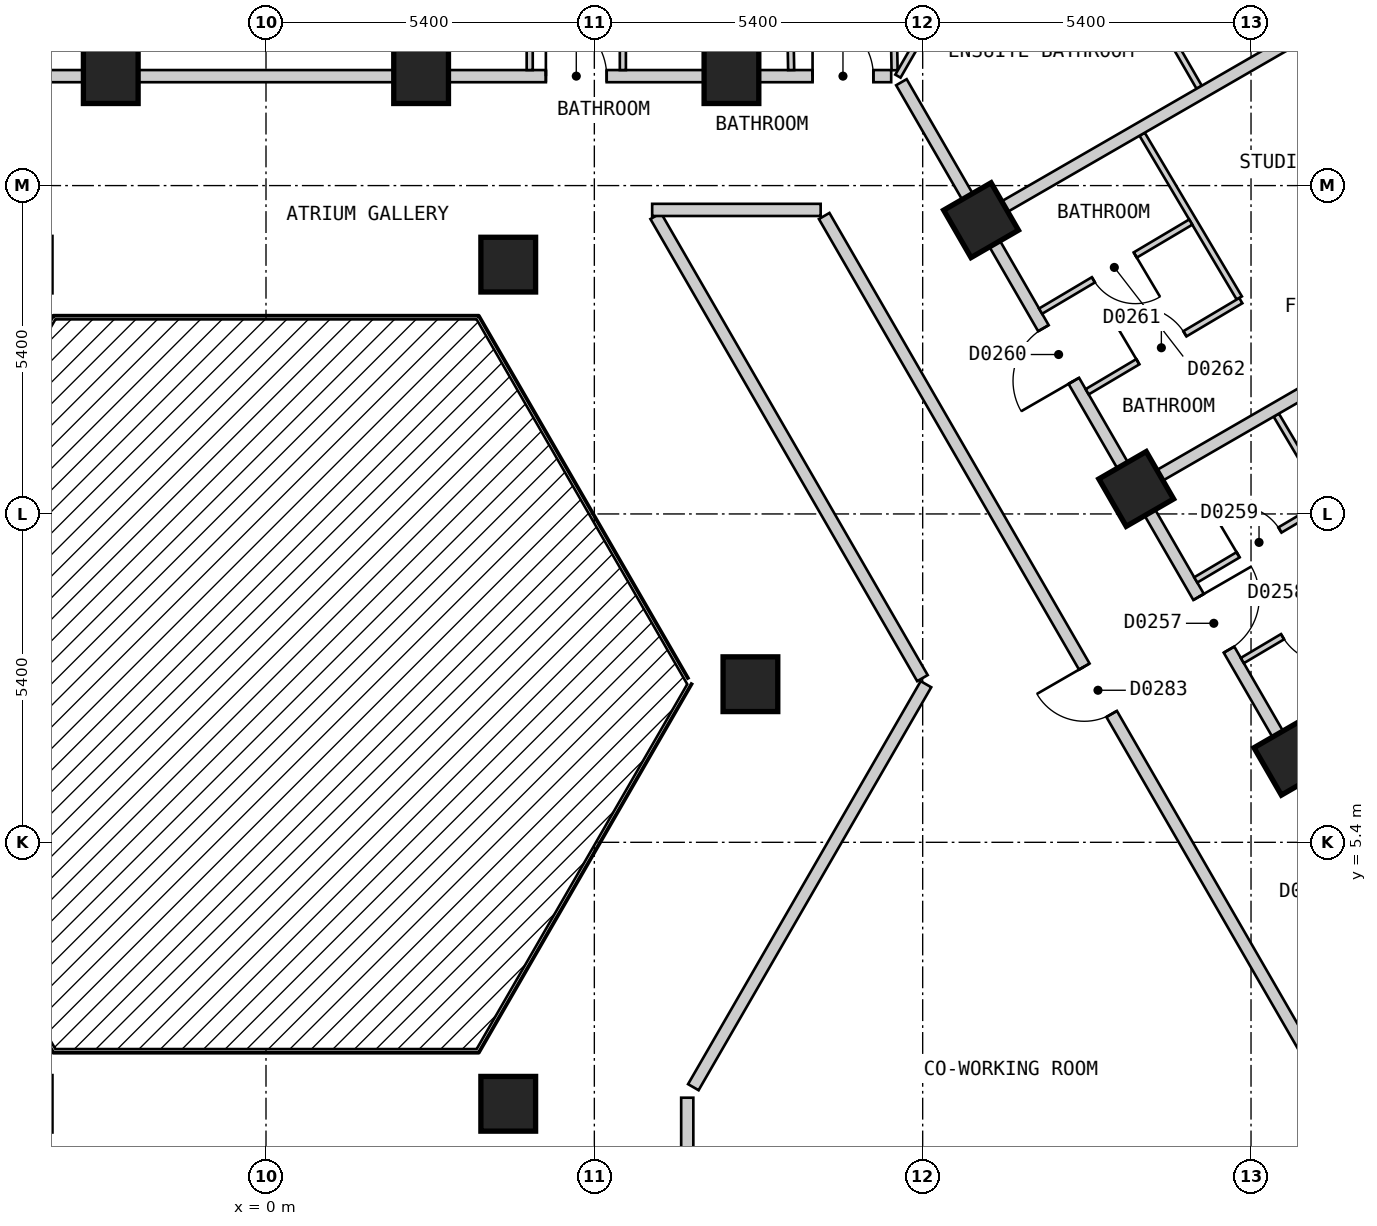
"""IFC4 building model, lengths in metres.
Left out: names, types, materials, properties, quantities, classifications, styles, units other than length and angle.
Written with IfcOpenShell. Run it as: python <this file> out.ifc"""

import sys

from ifc_helpers import new_model, si_unit, direction, frame, frame_2d, origin, origin_2d, place, context, subcontext, project, spatial, rectangle, extrude, element, fill, save


model = new_model("IFC4")
c1 = context("Model", 3, precision=1e-05, world=origin(), true_north=direction((0.0, 1.0)))
c2 = subcontext(c1, "Body", "Model", "MODEL_VIEW")
j1 = project(units=[si_unit("LENGTHUNIT", "METRE"), si_unit("PLANEANGLEUNIT", "RADIAN")], contexts=[c1])
p1 = place(None, origin())
s1 = spatial("IfcSite", under=j1, at=p1, CompositionType="ELEMENT")
p2 = place(p1, origin())
s2 = spatial("IfcBuilding", under=s1, at=p2, CompositionType="ELEMENT")
p3 = place(p2, frame((0.0, 0.0, 47.4)))
s3 = spatial("IfcBuildingStorey", under=s2, at=p3, CompositionType="ELEMENT", Elevation=47.4)
for number, where, z_axis, x_axis in (
    (1, (3.984, 1.1, 0.0), (0.0, 0.0, 1.0), (1.0, 0.0, 0.0)),
    (2, (16.864, 6.791, 0.0), (0.0, 0.0, 1.0), (-0.5, 0.866, 0.0)),
    (3, (14.312, 11.211, 0.0), (0.0, 0.0, 1.0), (-0.5, 0.866, 0.0)),
    (4, (7.967, 8.0, 0.0), (0.0, 0.0, 1.0), (1.0, 0.0, 0.0)),
    (5, (11.76, 15.631, 0.0), (0.0, 0.0, 1.0), (-0.5, 0.866, 0.0)),
    (6, (7.655, 18.0, 0.0), (0.0, 0.0, 1.0), (-1.0, 0.0, 0.0)),
    (7, (3.984, 14.9, 0.0), (0.0, 0.0, 1.0), (1.0, 0.0, 0.0)),
    (8, (2.551, 18.0, 0.0), (0.0, 0.0, 1.0), (-1.0, 0.0, 0.0)),
    (9, (-2.553, 18.0, 0.0), (0.0, 0.0, 1.0), (-1.0, 0.0, 0.0)),
):
    element("IfcColumn", number, at=place(p3, frame(where, z_axis=z_axis, x_axis=x_axis)), inside=s3, PredefinedType="COLUMN", context=c2, shape_type="SweptSolid", body=[
        extrude(rectangle(XDim=0.9, YDim=0.9, at=origin_2d()), origin(), (0.0, 0.0, 1.0), 3.0),
    ])
p4 = place(p3, frame((6.409, 15.7, 0.0), z_axis=(0.0, 0.0, 1.0), x_axis=(0.499930377127, -0.866065596838, 0.0)))
e10 = element("IfcWall", 10, at=p4, inside=s3, PredefinedType="PARTITIONING", context=c2, shape_type="SweptSolid", body=[
    extrude(rectangle(XDim=8.775, YDim=0.2, at=frame_2d((4.388, 0.0))), origin(), (0.0, 0.0, 1.0), 2.7),
])
p5 = place(p3, frame((9.18, 15.7, 0.0), z_axis=(0.0, 0.0, 1.0), x_axis=(0.500003652032, -0.866023295272, 0.0)))
e11 = element("IfcWall", 11, at=p5, inside=s3, PredefinedType="PARTITIONING", context=c2, shape_type="SweptSolid", body=[
    extrude(rectangle(XDim=18.012, YDim=0.2, at=frame_2d((9.006, 0.0))), origin(), (0.0, 0.0, 1.0), 2.7),
])
p6 = place(p5, frame((8.556, 0.0, 0.0)))
e12 = element("IfcOpeningElement", 12, at=p6, cuts=e11, PredefinedType="OPENING", context=c2, shape_type="SweptSolid", body=[
    extrude(rectangle(XDim=0.9, YDim=2.1, at=frame_2d((0.45, 1.05))), frame((0.0, 0.11, 0.0), z_axis=(0.0, -1.0, 0.0), x_axis=(1.0, 0.0, 0.0)), (0.0, 0.0, 1.0), 0.22),
])
p7 = place(p3, frame((10.45, 17.9, 0.0), z_axis=(0.0, 0.0, 1.0), x_axis=(0.500034352617, -0.866005569383, 0.0)))
e13 = element("IfcWall", 13, at=p7, inside=s3, PredefinedType="PARTITIONING", context=c2, shape_type="SweptSolid", body=[
    extrude(rectangle(XDim=20.553, YDim=0.2, at=frame_2d((10.276, 0.0))), origin(), (0.0, 0.0, 1.0), 2.7),
])
p8 = place(p7, frame((14.879, 0.0, 0.0)))
e14 = element("IfcOpeningElement", 14, at=p8, cuts=e13, PredefinedType="OPENING", context=c2, shape_type="SweptSolid", body=[
    extrude(rectangle(XDim=1.0, YDim=2.1, at=frame_2d((0.5, 1.05))), frame((0.0, 0.11, 0.0), z_axis=(0.0, -1.0, 0.0), x_axis=(1.0, 0.0, 0.0)), (0.0, 0.0, 1.0), 0.22),
])
p9 = place(p7, frame((9.775, 0.0, 0.0)))
e15 = element("IfcOpeningElement", 15, at=p9, cuts=e13, PredefinedType="OPENING", context=c2, shape_type="SweptSolid", body=[
    extrude(rectangle(XDim=1.0, YDim=2.1, at=frame_2d((0.5, 1.05))), frame((0.0, 0.11, 0.0), z_axis=(0.0, -1.0, 0.0), x_axis=(1.0, 0.0, 0.0)), (0.0, 0.0, 1.0), 0.22),
])
p10 = place(p7, frame((4.671, 0.0, 0.0)))
e16 = element("IfcOpeningElement", 16, at=p10, cuts=e13, PredefinedType="OPENING", context=c2, shape_type="SweptSolid", body=[
    extrude(rectangle(XDim=1.0, YDim=2.1, at=frame_2d((0.5, 1.05))), frame((0.0, 0.11, 0.0), z_axis=(0.0, -1.0, 0.0), x_axis=(1.0, 0.0, 0.0)), (0.0, 0.0, 1.0), 0.22),
])
p11 = place(p3, frame((6.351, 15.8, 0.0), z_axis=(0.0, 0.0, 1.0), x_axis=(1.0, 0.0, 0.0)))
e17 = element("IfcWall", 17, at=p11, inside=s3, PredefinedType="PARTITIONING", context=c2, shape_type="SweptSolid", body=[
    extrude(rectangle(XDim=2.771, YDim=0.2, at=frame_2d((1.385, 0.0))), origin(), (0.0, 0.0, 1.0), 2.7),
])
p12 = place(p3, frame((-10.276, 18.0, 0.0), z_axis=(0.0, 0.0, 1.0), x_axis=(1.0, 0.0, 0.0)))
e18 = element("IfcWall", 18, at=p12, inside=s3, PredefinedType="PARTITIONING", context=c2, shape_type="SweptSolid", body=[
    extrude(rectangle(XDim=20.558, YDim=0.2, at=frame_2d((10.279, 0.0))), origin(), (0.0, 0.0, 1.0), 2.7),
])
p13 = place(p12, frame((19.265, 0.0, 0.0)))
e19 = element("IfcOpeningElement", 19, at=p13, cuts=e18, PredefinedType="OPENING", context=c2, shape_type="SweptSolid", body=[
    extrude(rectangle(XDim=1.0, YDim=2.1, at=frame_2d((0.5, 1.05))), frame((0.0, 0.11, 0.0), z_axis=(0.0, -1.0, 0.0), x_axis=(1.0, 0.0, 0.0)), (0.0, 0.0, 1.0), 0.22),
])
p14 = place(p12, frame((14.879, 0.0, 0.0)))
e20 = element("IfcOpeningElement", 20, at=p14, cuts=e18, PredefinedType="OPENING", context=c2, shape_type="SweptSolid", body=[
    extrude(rectangle(XDim=1.0, YDim=2.1, at=frame_2d((0.5, 1.05))), frame((0.0, 0.11, 0.0), z_axis=(0.0, -1.0, 0.0), x_axis=(1.0, 0.0, 0.0)), (0.0, 0.0, 1.0), 0.22),
])
p15 = place(p12, frame((4.671, 0.0, 0.0)))
e21 = element("IfcOpeningElement", 21, at=p15, cuts=e18, PredefinedType="OPENING", context=c2, shape_type="SweptSolid", body=[
    extrude(rectangle(XDim=1.0, YDim=2.1, at=frame_2d((0.5, 1.05))), frame((0.0, 0.11, 0.0), z_axis=(0.0, -1.0, 0.0), x_axis=(1.0, 0.0, 0.0)), (0.0, 0.0, 1.0), 0.22),
])
p16 = place(p3, frame((7.028, 1.373, 0.0), z_axis=(0.0, 0.0, 1.0), x_axis=(0.49998574534, 0.86603363356, 0.0)))
e22 = element("IfcWall", 22, at=p16, inside=s3, PredefinedType="PARTITIONING", context=c2, shape_type="SweptSolid", body=[
    extrude(rectangle(XDim=7.652, YDim=0.2, at=frame_2d((3.826, 0.0))), origin(), (0.0, 0.0, 1.0), 2.7),
])
p17 = place(p3, frame((6.928, -2.8, 0.0), z_axis=(0.0, 0.0, 1.0), x_axis=(0.0, 1.0, 0.0)))
e23 = element("IfcWall", 23, at=p17, inside=s3, PredefinedType="PARTITIONING", context=c2, shape_type="SweptSolid", body=[
    extrude(rectangle(XDim=4.0, YDim=0.2, at=frame_2d((2.0, 0.0))), origin(), (0.0, 0.0, 1.0), 2.7),
])
p18 = place(p3, frame((16.615, 12.425, 0.0), z_axis=(0.0, 0.0, 1.0), x_axis=(0.510241930604, -0.860030913546, 0.0)))
e24 = element("IfcWall", 24, at=p18, inside=s3, PredefinedType="PARTITIONING", context=c2, shape_type="SweptSolid", body=[
    extrude(rectangle(XDim=3.136, YDim=0.1, at=frame_2d((1.568, 0.0))), origin(), (0.0, 0.0, 1.0), 2.7),
])
p19 = place(p3, frame((14.409, 17.045, 0.0), z_axis=(0.0, 0.0, 1.0), x_axis=(0.510362209222, -0.859959542884, 0.0)))
e25 = element("IfcWall", 25, at=p19, inside=s3, PredefinedType="PARTITIONING", context=c2, shape_type="SweptSolid", body=[
    extrude(rectangle(XDim=3.131, YDim=0.1, at=frame_2d((1.566, 0.0))), origin(), (0.0, 0.0, 1.0), 2.7),
])
p20 = place(p3, frame((12.846, 22.15, 0.0), z_axis=(0.0, 0.0, 1.0), x_axis=(0.500002715276, -0.866023836113, 0.0)))
e26 = element("IfcWall", 26, at=p20, inside=s3, PredefinedType="PARTITIONING", context=c2, shape_type="SweptSolid", body=[
    extrude(rectangle(XDim=5.002, YDim=0.1, at=frame_2d((2.501, 0.0))), origin(), (0.0, 0.0, 1.0), 2.7),
])
p21 = place(p20, frame((2.122, 0.0, 0.0)))
e27 = element("IfcOpeningElement", 27, at=p21, cuts=e26, PredefinedType="OPENING", context=c2, shape_type="SweptSolid", body=[
    extrude(rectangle(XDim=0.8, YDim=2.1, at=frame_2d((0.4, 1.05))), frame((0.0, 0.06, 0.0), z_axis=(0.0, -1.0, 0.0), x_axis=(1.0, 0.0, 0.0)), (0.0, 0.0, 1.0), 0.12),
])
p22 = place(p3, frame((8.562, 22.15, 0.0), z_axis=(0.0, 0.0, 1.0), x_axis=(0.018504185939, -0.999828782894, 0.0)))
e28 = element("IfcWall", 28, at=p22, inside=s3, PredefinedType="PARTITIONING", context=c2, shape_type="SweptSolid", body=[
    extrude(rectangle(XDim=4.051, YDim=0.1, at=frame_2d((2.025, 0.0))), origin(), (0.0, 0.0, 1.0), 2.7),
])
p23 = place(p22, frame((1.65, 0.0, 0.0)))
e29 = element("IfcOpeningElement", 29, at=p23, cuts=e28, PredefinedType="OPENING", context=c2, shape_type="SweptSolid", body=[
    extrude(rectangle(XDim=0.8, YDim=2.1, at=frame_2d((0.4, 1.05))), frame((0.0, 0.06, 0.0), z_axis=(0.0, -1.0, 0.0), x_axis=(1.0, 0.0, 0.0)), (0.0, 0.0, 1.0), 0.12),
])
p24 = place(p3, frame((10.262, 22.15, 0.0), z_axis=(0.0, 0.0, 1.0), x_axis=(0.018730524712, -0.999824568334, 0.0)))
e30 = element("IfcWall", 30, at=p24, inside=s3, PredefinedType="PARTITIONING", context=c2, shape_type="SweptSolid", body=[
    extrude(rectangle(XDim=4.054, YDim=0.1, at=frame_2d((2.027, 0.0))), origin(), (0.0, 0.0, 1.0), 2.7),
])
p25 = place(p24, frame((1.6, 0.0, 0.0)))
e31 = element("IfcOpeningElement", 31, at=p25, cuts=e30, PredefinedType="OPENING", context=c2, shape_type="SweptSolid", body=[
    extrude(rectangle(XDim=0.9, YDim=2.1, at=frame_2d((0.45, 1.05))), frame((0.0, 0.06, 0.0), z_axis=(0.0, -1.0, 0.0), x_axis=(1.0, 0.0, 0.0)), (0.0, 0.0, 1.0), 0.12),
])
p26 = place(p3, frame((2.551, 21.57, 0.0), z_axis=(0.0, 0.0, 1.0), x_axis=(0.0, -1.0, 0.0)))
e32 = element("IfcWall", 32, at=p26, inside=s3, PredefinedType="PARTITIONING", context=c2, shape_type="SweptSolid", body=[
    extrude(rectangle(XDim=3.47, YDim=0.1, at=frame_2d((1.735, 0.0))), origin(), (0.0, 0.0, 1.0), 2.7),
])
p27 = place(p3, frame((10.393, 18.0, 0.0), z_axis=(0.0, 0.0, 1.0), x_axis=(0.499945497007, 0.866056868816, 0.0)))
e33 = element("IfcWall", 33, at=p27, inside=s3, PredefinedType="PARTITIONING", context=c2, shape_type="SweptSolid", body=[
    extrude(rectangle(XDim=10.265, YDim=0.1, at=frame_2d((5.132, 0.0))), origin(), (0.0, 0.0, 1.0), 2.7),
])
p28 = place(p27, frame((7.108, 0.0, 0.0)))
e34 = element("IfcOpeningElement", 34, at=p28, cuts=e33, PredefinedType="OPENING", context=c2, shape_type="SweptSolid", body=[
    extrude(rectangle(XDim=0.9, YDim=2.1, at=frame_2d((0.45, 1.05))), frame((0.0, 0.06, 0.0), z_axis=(0.0, -1.0, 0.0), x_axis=(1.0, 0.0, 0.0)), (0.0, 0.0, 1.0), 0.12),
])
p29 = place(p3, frame((4.337, 18.1, 0.0), z_axis=(0.0, 0.0, 1.0), x_axis=(0.0, 1.0, 0.0)))
e35 = element("IfcWall", 35, at=p29, inside=s3, PredefinedType="PARTITIONING", context=c2, shape_type="SweptSolid", body=[
    extrude(rectangle(XDim=2.559, YDim=0.1, at=frame_2d((1.279, 0.0))), origin(), (0.0, 0.0, 1.0), 2.7),
])
p30 = place(p29, frame((0.78, 0.0, 0.0)))
e36 = element("IfcOpeningElement", 36, at=p30, cuts=e35, PredefinedType="OPENING", context=c2, shape_type="SweptSolid", body=[
    extrude(rectangle(XDim=0.9, YDim=2.1, at=frame_2d((0.45, 1.05))), frame((0.0, 0.06, 0.0), z_axis=(0.0, -1.0, 0.0), x_axis=(1.0, 0.0, 0.0)), (0.0, 0.0, 1.0), 0.12),
])
p31 = place(p3, frame((5.869, 18.1, 0.0), z_axis=(0.0, 0.0, 1.0), x_axis=(0.0, 1.0, 0.0)))
e37 = element("IfcWall", 37, at=p31, inside=s3, PredefinedType="PARTITIONING", context=c2, shape_type="SweptSolid", body=[
    extrude(rectangle(XDim=2.51, YDim=0.1, at=frame_2d((1.255, 0.0))), origin(), (0.0, 0.0, 1.0), 2.7),
])
p32 = place(p31, frame((0.83, 0.0, 0.0)))
e38 = element("IfcOpeningElement", 38, at=p32, cuts=e37, PredefinedType="OPENING", context=c2, shape_type="SweptSolid", body=[
    extrude(rectangle(XDim=0.8, YDim=2.1, at=frame_2d((0.4, 1.05))), frame((0.0, 0.06, 0.0), z_axis=(0.0, -1.0, 0.0), x_axis=(1.0, 0.0, 0.0)), (0.0, 0.0, 1.0), 0.12),
])
p33 = place(p3, frame((16.057, 8.389, 0.0), z_axis=(0.0, 0.0, 1.0), x_axis=(0.860036770423, 0.510232058499, 0.0)))
e39 = element("IfcWall", 39, at=p33, inside=s3, PredefinedType="PARTITIONING", context=c2, shape_type="SweptSolid", body=[
    extrude(rectangle(XDim=2.538, YDim=0.1, at=frame_2d((1.269, 0.0))), origin(), (0.0, 0.0, 1.0), 2.7),
])
p34 = place(p33, frame((0.769, 0.0, 0.0)))
e40 = element("IfcOpeningElement", 40, at=p34, cuts=e39, PredefinedType="OPENING", context=c2, shape_type="SweptSolid", body=[
    extrude(rectangle(XDim=0.9, YDim=2.1, at=frame_2d((0.45, 1.05))), frame((0.0, 0.06, 0.0), z_axis=(0.0, -1.0, 0.0), x_axis=(1.0, 0.0, 0.0)), (0.0, 0.0, 1.0), 0.12),
])
p35 = place(p3, frame((13.505, 12.809, 0.0), z_axis=(0.0, 0.0, 1.0), x_axis=(0.860070102739, 0.510175870043, 0.0)))
e41 = element("IfcWall", 41, at=p35, inside=s3, PredefinedType="PARTITIONING", context=c2, shape_type="SweptSolid", body=[
    extrude(rectangle(XDim=2.938, YDim=0.1, at=frame_2d((1.469, 0.0))), origin(), (0.0, 0.0, 1.0), 2.7),
])
p36 = place(p35, frame((0.969, 0.0, 0.0)))
e42 = element("IfcOpeningElement", 42, at=p36, cuts=e41, PredefinedType="OPENING", context=c2, shape_type="SweptSolid", body=[
    extrude(rectangle(XDim=0.9, YDim=2.1, at=frame_2d((0.45, 1.05))), frame((0.0, 0.06, 0.0), z_axis=(0.0, -1.0, 0.0), x_axis=(1.0, 0.0, 0.0)), (0.0, 0.0, 1.0), 0.12),
])
p37 = place(p3, frame((12.739, 14.135, 0.0), z_axis=(0.0, 0.0, 1.0), x_axis=(0.860077414703, 0.510163543109, 0.0)))
e43 = element("IfcWall", 43, at=p37, inside=s3, PredefinedType="PARTITIONING", context=c2, shape_type="SweptSolid", body=[
    extrude(rectangle(XDim=2.872, YDim=0.1, at=frame_2d((1.436, 0.0))), origin(), (0.0, 0.0, 1.0), 2.7),
])
p38 = place(p37, frame((1.01, 0.0, 0.0)))
e44 = element("IfcOpeningElement", 44, at=p38, cuts=e43, PredefinedType="OPENING", context=c2, shape_type="SweptSolid", body=[
    extrude(rectangle(XDim=0.8, YDim=2.1, at=frame_2d((0.4, 1.05))), frame((0.0, 0.06, 0.0), z_axis=(0.0, -1.0, 0.0), x_axis=(1.0, 0.0, 0.0)), (0.0, 0.0, 1.0), 0.12),
])
p39 = place(p3, frame((15.291, 9.715, 0.0), z_axis=(0.0, 0.0, 1.0), x_axis=(0.860087708271, 0.510146188932, 0.0)))
e45 = element("IfcWall", 45, at=p39, inside=s3, PredefinedType="PARTITIONING", context=c2, shape_type="SweptSolid", body=[
    extrude(rectangle(XDim=2.472, YDim=0.1, at=frame_2d((1.236, 0.0))), origin(), (0.0, 0.0, 1.0), 2.7),
])
p40 = place(p39, frame((0.81, 0.0, 0.0)))
e46 = element("IfcOpeningElement", 46, at=p40, cuts=e45, PredefinedType="OPENING", context=c2, shape_type="SweptSolid", body=[
    extrude(rectangle(XDim=0.8, YDim=2.1, at=frame_2d((0.4, 1.05))), frame((0.0, 0.06, 0.0), z_axis=(0.0, -1.0, 0.0), x_axis=(1.0, 0.0, 0.0)), (0.0, 0.0, 1.0), 0.12),
])
p41 = place(p3, frame((7.655, 20.68, 0.0), z_axis=(0.0, 0.0, 1.0), x_axis=(0.0, -1.0, 0.0)))
e47 = element("IfcWall", 47, at=p41, inside=s3, PredefinedType="PARTITIONING", context=c2, shape_type="SweptSolid", body=[
    extrude(rectangle(XDim=2.58, YDim=0.2, at=frame_2d((1.29, 0.0))), origin(), (0.0, 0.0, 1.0), 2.7),
])
p42 = place(p3, frame((-2.553, 18.1, 0.0), z_axis=(0.0, 0.0, 1.0), x_axis=(0.0, 1.0, 0.0)))
e48 = element("IfcWall", 48, at=p42, inside=s3, PredefinedType="PARTITIONING", context=c2, shape_type="SweptSolid", body=[
    extrude(rectangle(XDim=3.5, YDim=0.2, at=frame_2d((1.75, 0.0))), origin(), (0.0, 0.0, 1.0), 2.7),
])
for number, where, z_axis, x_axis in (
    (49, (16.95, 6.841, 0.0), (0.0, 0.0, 1.0), (0.866, 0.5, 0.0)),
    (50, (11.847, 15.681, 0.0), (0.0, 0.0, 1.0), (0.866, 0.5, 0.0)),
    (51, (14.399, 11.261, 0.0), (0.0, 0.0, 1.0), (0.866, 0.5, 0.0)),
):
    element("IfcWall", number, at=place(p3, frame(where, z_axis=z_axis, x_axis=x_axis)), inside=s3, PredefinedType="PARTITIONING", context=c2, shape_type="SweptSolid", body=[
        extrude(rectangle(XDim=10.0, YDim=0.2, at=frame_2d((5.0, 0.0))), origin(), (0.0, 0.0, 1.0), 2.7),
    ])
p43 = place(p9, origin())
e52 = element("IfcDoor", 52, at=p43, inside=s3, OperationType="SINGLE_SWING_LEFT", PredefinedType="DOOR", context=c2, shape_type="SweptSolid", body=[
    extrude(rectangle(XDim=1.0, YDim=2.1, at=frame_2d((0.5, 1.05))), frame((0.0, 0.025, 0.0), z_axis=(0.0, -1.0, 0.0), x_axis=(1.0, 0.0, 0.0)), (0.0, 0.0, 1.0), 0.05),
])
fill(e15, e52)
p44 = place(p34, origin())
e53 = element("IfcDoor", 53, at=p44, inside=s3, OperationType="SINGLE_SWING_RIGHT", PredefinedType="DOOR", context=c2, shape_type="SweptSolid", body=[
    extrude(rectangle(XDim=0.9, YDim=2.1, at=frame_2d((0.45, 1.05))), frame((0.0, 0.025, 0.0), z_axis=(0.0, -1.0, 0.0), x_axis=(1.0, 0.0, 0.0)), (0.0, 0.0, 1.0), 0.05),
])
fill(e40, e53)
p45 = place(p40, origin())
e54 = element("IfcDoor", 54, at=p45, inside=s3, OperationType="SINGLE_SWING_LEFT", PredefinedType="DOOR", context=c2, shape_type="SweptSolid", body=[
    extrude(rectangle(XDim=0.8, YDim=2.1, at=frame_2d((0.4, 1.05))), frame((0.0, 0.025, 0.0), z_axis=(0.0, -1.0, 0.0), x_axis=(1.0, 0.0, 0.0)), (0.0, 0.0, 1.0), 0.05),
])
fill(e46, e54)
p46 = place(p10, origin())
e55 = element("IfcDoor", 55, at=p46, inside=s3, OperationType="SINGLE_SWING_RIGHT", PredefinedType="DOOR", context=c2, shape_type="SweptSolid", body=[
    extrude(rectangle(XDim=1.0, YDim=2.1, at=frame_2d((0.5, 1.05))), frame((0.0, 0.025, 0.0), z_axis=(0.0, -1.0, 0.0), x_axis=(1.0, 0.0, 0.0)), (0.0, 0.0, 1.0), 0.05),
])
fill(e16, e55)
p47 = place(p36, origin())
e56 = element("IfcDoor", 56, at=p47, inside=s3, OperationType="SINGLE_SWING_LEFT", PredefinedType="DOOR", context=c2, shape_type="SweptSolid", body=[
    extrude(rectangle(XDim=0.9, YDim=2.1, at=frame_2d((0.45, 1.05))), frame((0.0, 0.025, 0.0), z_axis=(0.0, -1.0, 0.0), x_axis=(1.0, 0.0, 0.0)), (0.0, 0.0, 1.0), 0.05),
])
fill(e42, e56)
p48 = place(p38, origin())
e57 = element("IfcDoor", 57, at=p48, inside=s3, OperationType="SINGLE_SWING_RIGHT", PredefinedType="DOOR", context=c2, shape_type="SweptSolid", body=[
    extrude(rectangle(XDim=0.8, YDim=2.1, at=frame_2d((0.4, 1.05))), frame((0.0, 0.025, 0.0), z_axis=(0.0, -1.0, 0.0), x_axis=(1.0, 0.0, 0.0)), (0.0, 0.0, 1.0), 0.05),
])
fill(e44, e57)
p49 = place(p13, origin())
e58 = element("IfcDoor", 58, at=p49, inside=s3, OperationType="SINGLE_SWING_LEFT", PredefinedType="DOOR", context=c2, shape_type="SweptSolid", body=[
    extrude(rectangle(XDim=1.0, YDim=2.1, at=frame_2d((0.5, 1.05))), frame((0.0, 0.025, 0.0), z_axis=(0.0, -1.0, 0.0), x_axis=(1.0, 0.0, 0.0)), (0.0, 0.0, 1.0), 0.05),
])
fill(e19, e58)
p50 = place(p14, origin())
e59 = element("IfcDoor", 59, at=p50, inside=s3, OperationType="SINGLE_SWING_LEFT", PredefinedType="DOOR", context=c2, shape_type="SweptSolid", body=[
    extrude(rectangle(XDim=1.0, YDim=2.1, at=frame_2d((0.5, 1.05))), frame((0.0, 0.025, 0.0), z_axis=(0.0, -1.0, 0.0), x_axis=(1.0, 0.0, 0.0)), (0.0, 0.0, 1.0), 0.05),
])
fill(e20, e59)
p51 = place(p6, origin())
e60 = element("IfcDoor", 60, at=p51, inside=s3, OperationType="SINGLE_SWING_LEFT", PredefinedType="DOOR", context=c2, shape_type="SweptSolid", body=[
    extrude(rectangle(XDim=0.9, YDim=2.1, at=frame_2d((0.45, 1.05))), frame((0.0, 0.025, 0.0), z_axis=(0.0, -1.0, 0.0), x_axis=(1.0, 0.0, 0.0)), (0.0, 0.0, 1.0), 0.05),
])
fill(e12, e60)
save(model, sys.argv[1])
